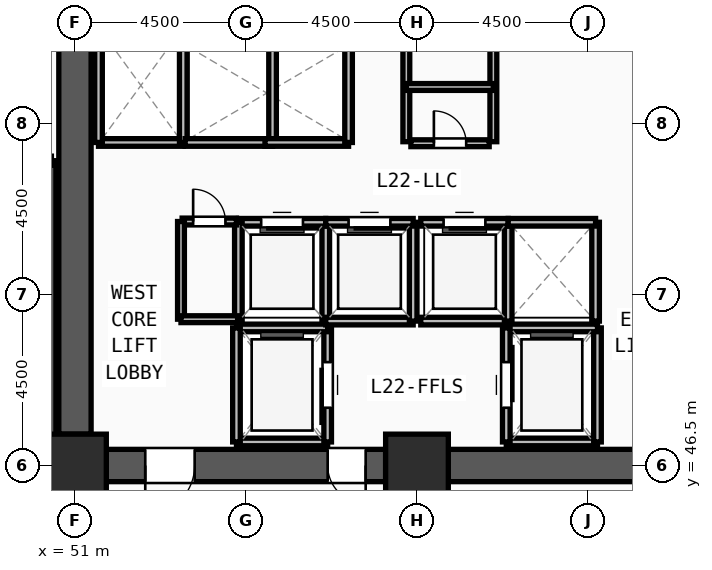
"""IFC4 building model, lengths in metres.
Left out: names, types, materials, properties, quantities, classifications, styles, units other than length and angle.
Written with IfcOpenShell. Run it as: python <this file> out.ifc"""

import sys

from ifc_helpers import new_model, si_unit, direction, frame, frame_2d, origin, origin_2d, place, context, subcontext, project, spatial, rectangle, extrude, source, transform, mapped, element, fill, save


model = new_model("IFC4")
c1 = context("Model", 3, precision=1e-05, world=origin(), true_north=direction((0.0, 1.0)))
c2 = subcontext(c1, "Body", "Model", "MODEL_VIEW")
j1 = project(units=[si_unit("LENGTHUNIT", "METRE"), si_unit("PLANEANGLEUNIT", "RADIAN")], contexts=[c1])
p1 = place(None, origin())
s1 = spatial("IfcSite", under=j1, at=p1, CompositionType="ELEMENT")
p2 = place(p1, origin())
s2 = spatial("IfcBuilding", under=s1, at=p2, CompositionType="ELEMENT")
p3 = place(p2, frame((0.0, 0.0, 85.5)))
s3 = spatial("IfcBuildingStorey", under=s2, at=p3, CompositionType="ELEMENT", Elevation=85.5)
m1 = source(origin(), c2, "Body", "SweptSolid", [
    extrude(rectangle(XDim=1.65, YDim=1.65, at=origin_2d()), origin(), (0.0, 0.0, 1.0), 3.75),
])
for number, where, z_axis, x_axis in (
    (1, (51.0, 46.5, 0.0), (0.0, 0.0, 1.0), (1.0, 0.0, 0.0)),
    (2, (60.0, 46.5, 0.0), (0.0, 0.0, 1.0), (1.0, 0.0, 0.0)),
):
    element("IfcColumn", number, at=place(p3, frame(where, z_axis=z_axis, x_axis=x_axis)), inside=s3, PredefinedType="COLUMN", context=c2, shape_type="MappedRepresentation", body=[
        mapped(m1, transform((0.0, 0.0, 0.0), x_axis=(1.0, 0.0, 0.0), y_axis=(0.0, 1.0, 0.0), z_axis=(0.0, 0.0, 1.0), scale=1.0)),
    ])
p4 = place(p3, frame((68.175, 46.5, 0.0), z_axis=(0.0, 0.0, 1.0), x_axis=(-1.0, 0.0, 0.0)))
e3 = element("IfcWall", 3, at=p4, inside=s3, PredefinedType="SHEAR", context=c2, shape_type="SweptSolid", body=[
    extrude(rectangle(XDim=7.35, YDim=0.85, at=frame_2d((3.675, 0.0))), origin(), (0.0, 0.0, 1.0), 3.57),
])
m2 = source(origin(), c2, "Body", "SweptSolid", [
    extrude(rectangle(XDim=1.3, YDim=2.2, at=frame_2d((0.65, 1.1))), frame((0.0, 0.435, 0.0), z_axis=(0.0, -1.0, 0.0), x_axis=(1.0, 0.0, 0.0)), (0.0, 0.0, 1.0), 0.87),
])
p5 = place(p4, frame((1.025, 0.0, 0.0)))
e4 = element("IfcOpeningElement", 4, at=p5, cuts=e3, PredefinedType="OPENING", context=c2, shape_type="MappedRepresentation", body=[
    mapped(m2, transform((0.0, 0.0, 0.0), x_axis=(1.0, 0.0, 0.0), y_axis=(0.0, 1.0, 0.0), z_axis=(0.0, 0.0, 1.0), scale=1.0)),
])
p6 = place(p3, frame((59.175, 46.5, 0.0), z_axis=(0.0, 0.0, 1.0), x_axis=(-1.0, 0.0, 0.0)))
e5 = element("IfcWall", 5, at=p6, inside=s3, PredefinedType="SHEAR", context=c2, shape_type="SweptSolid", body=[
    extrude(rectangle(XDim=7.35, YDim=0.85, at=frame_2d((3.675, 0.0))), origin(), (0.0, 0.0, 1.0), 3.57),
])
p7 = place(p6, frame((5.025, 0.0, 0.0)))
e6 = element("IfcOpeningElement", 6, at=p7, cuts=e5, PredefinedType="OPENING", context=c2, shape_type="MappedRepresentation", body=[
    mapped(m2, transform((0.0, 0.0, 0.0), x_axis=(1.0, 0.0, 0.0), y_axis=(0.0, 1.0, 0.0), z_axis=(0.0, 0.0, 1.0), scale=1.0)),
])
m3 = source(origin(), c2, "Body", "SweptSolid", [
    extrude(rectangle(XDim=1.0, YDim=2.2, at=frame_2d((0.5, 1.1))), frame((0.0, 0.435, 0.0), z_axis=(0.0, -1.0, 0.0), x_axis=(1.0, 0.0, 0.0)), (0.0, 0.0, 1.0), 0.87),
])
p8 = place(p6, frame((0.525, 0.0, 0.0)))
e7 = element("IfcOpeningElement", 7, at=p8, cuts=e5, PredefinedType="OPENING", context=c2, shape_type="MappedRepresentation", body=[
    mapped(m3, transform((0.0, 0.0, 0.0), x_axis=(1.0, 0.0, 0.0), y_axis=(0.0, 1.0, 0.0), z_axis=(0.0, 0.0, 1.0), scale=1.0)),
])
p9 = place(p3, frame((51.0, 47.325, 0.0), z_axis=(0.0, 0.0, 1.0), x_axis=(0.0, 1.0, 0.0)))
e8 = element("IfcWall", 8, at=p9, inside=s3, PredefinedType="SHEAR", context=c2, shape_type="SweptSolid", body=[
    extrude(rectangle(XDim=13.35, YDim=0.85, at=frame_2d((6.675, 0.0))), origin(), (0.0, 0.0, 1.0), 3.57),
])
p10 = place(p3, frame((50.38, 46.7, 0.0), z_axis=(0.0, 0.0, 1.0), x_axis=(0.0, 1.0, 0.0)))
e9 = element("IfcWall", 9, at=p10, inside=s3, PredefinedType="SOLIDWALL", context=c2, shape_type="SweptSolid", body=[
    extrude(rectangle(XDim=7.82, YDim=0.24, at=frame_2d((3.91, 0.0))), origin(), (0.0, 0.0, 1.0), 3.57),
])
p11 = place(p3, frame((55.25, 47.12, 0.0), z_axis=(0.0, 0.0, 1.0), x_axis=(1.0, 0.0, 0.0)))
e10 = element("IfcWall", 10, at=p11, inside=s3, PredefinedType="SOLIDWALL", context=c2, shape_type="SweptSolid", body=[
    extrude(rectangle(XDim=2.4, YDim=0.2, at=frame_2d((1.2, 0.0))), origin(), (0.0, 0.0, 1.0), 3.57),
])
p12 = place(p3, frame((57.65, 47.12, 0.0), z_axis=(0.0, 0.0, 1.0), x_axis=(0.0, 1.0, 0.0)))
e11 = element("IfcWall", 11, at=p12, inside=s3, PredefinedType="SOLIDWALL", context=c2, shape_type="SweptSolid", body=[
    extrude(rectangle(XDim=3.0, YDim=0.2, at=frame_2d((1.5, 0.0))), origin(), (0.0, 0.0, 1.0), 3.57),
])
m4 = source(origin(), c2, "Body", "SweptSolid", [
    extrude(rectangle(XDim=1.2, YDim=2.3, at=frame_2d((0.6, 1.15))), frame((0.0, 0.11, 0.0), z_axis=(0.0, -1.0, 0.0), x_axis=(1.0, 0.0, 0.0)), (0.0, 0.0, 1.0), 0.22),
])
p13 = place(p12, frame((0.9, 0.0, 0.0)))
e12 = element("IfcOpeningElement", 12, at=p13, cuts=e11, PredefinedType="OPENING", context=c2, shape_type="MappedRepresentation", body=[
    mapped(m4, transform((0.0, 0.0, 0.0), x_axis=(1.0, 0.0, 0.0), y_axis=(0.0, 1.0, 0.0), z_axis=(0.0, 0.0, 1.0), scale=1.0)),
])
p14 = place(p3, frame((57.65, 50.12, 0.0), z_axis=(0.0, 0.0, 1.0), x_axis=(-1.0, 0.0, 0.0)))
e13 = element("IfcWall", 13, at=p14, inside=s3, PredefinedType="SOLIDWALL", context=c2, shape_type="SweptSolid", body=[
    extrude(rectangle(XDim=2.4, YDim=0.2, at=frame_2d((1.2, 0.0))), origin(), (0.0, 0.0, 1.0), 3.57),
])
p15 = place(p3, frame((55.25, 50.12, 0.0), z_axis=(0.0, 0.0, 1.0), x_axis=(0.0, -1.0, 0.0)))
e14 = element("IfcWall", 14, at=p15, inside=s3, PredefinedType="SOLIDWALL", context=c2, shape_type="SweptSolid", body=[
    extrude(rectangle(XDim=3.0, YDim=0.2, at=frame_2d((1.5, 0.0))), origin(), (0.0, 0.0, 1.0), 3.57),
])
p16 = place(p3, frame((62.35, 47.12, 0.0), z_axis=(0.0, 0.0, 1.0), x_axis=(1.0, 0.0, 0.0)))
e15 = element("IfcWall", 15, at=p16, inside=s3, PredefinedType="SOLIDWALL", context=c2, shape_type="SweptSolid", body=[
    extrude(rectangle(XDim=2.4, YDim=0.2, at=frame_2d((1.2, 0.0))), origin(), (0.0, 0.0, 1.0), 3.57),
])
p17 = place(p3, frame((64.75, 47.12, 0.0), z_axis=(0.0, 0.0, 1.0), x_axis=(0.0, 1.0, 0.0)))
e16 = element("IfcWall", 16, at=p17, inside=s3, PredefinedType="SOLIDWALL", context=c2, shape_type="SweptSolid", body=[
    extrude(rectangle(XDim=3.0, YDim=0.2, at=frame_2d((1.5, 0.0))), origin(), (0.0, 0.0, 1.0), 3.57),
])
p18 = place(p3, frame((64.75, 50.12, 0.0), z_axis=(0.0, 0.0, 1.0), x_axis=(-1.0, 0.0, 0.0)))
e17 = element("IfcWall", 17, at=p18, inside=s3, PredefinedType="SOLIDWALL", context=c2, shape_type="SweptSolid", body=[
    extrude(rectangle(XDim=2.4, YDim=0.2, at=frame_2d((1.2, 0.0))), origin(), (0.0, 0.0, 1.0), 3.57),
])
p19 = place(p3, frame((62.35, 50.12, 0.0), z_axis=(0.0, 0.0, 1.0), x_axis=(0.0, -1.0, 0.0)))
e18 = element("IfcWall", 18, at=p19, inside=s3, PredefinedType="SOLIDWALL", context=c2, shape_type="SweptSolid", body=[
    extrude(rectangle(XDim=3.0, YDim=0.2, at=frame_2d((1.5, 0.0))), origin(), (0.0, 0.0, 1.0), 3.57),
])
p20 = place(p19, frame((0.9, 0.0, 0.0)))
e19 = element("IfcOpeningElement", 19, at=p20, cuts=e18, PredefinedType="OPENING", context=c2, shape_type="MappedRepresentation", body=[
    mapped(m4, transform((0.0, 0.0, 0.0), x_axis=(1.0, 0.0, 0.0), y_axis=(0.0, 1.0, 0.0), z_axis=(0.0, 0.0, 1.0), scale=1.0)),
])
p21 = place(p3, frame((51.62, 55.0, 0.0), z_axis=(0.0, 0.0, 1.0), x_axis=(1.0, 0.0, 0.0)))
e20 = element("IfcWall", 20, at=p21, inside=s3, PredefinedType="SOLIDWALL", context=c2, shape_type="SweptSolid", body=[
    extrude(rectangle(XDim=2.23, YDim=0.2, at=frame_2d((1.115, 0.0))), origin(), (0.0, 0.0, 1.0), 3.57),
])
for number, where, z_axis, x_axis in (
    (21, (53.85, 55.0, 0.0), (0.0, 0.0, 1.0), (0.0, 1.0, 0.0)),
    (22, (51.62, 58.0, 0.0), (0.0, 0.0, 1.0), (0.0, -1.0, 0.0)),
):
    element("IfcWall", number, at=place(p3, frame(where, z_axis=z_axis, x_axis=x_axis)), inside=s3, PredefinedType="SOLIDWALL", context=c2, shape_type="SweptSolid", body=[
        extrude(rectangle(XDim=3.0, YDim=0.2, at=frame_2d((1.5, 0.0))), origin(), (0.0, 0.0, 1.0), 3.57),
    ])
p22 = place(p3, frame((57.6, 50.3, 0.0), z_axis=(0.0, 0.0, 1.0), x_axis=(0.0, 1.0, 0.0)))
e23 = element("IfcWall", 23, at=p22, inside=s3, PredefinedType="SOLIDWALL", context=c2, shape_type="SweptSolid", body=[
    extrude(rectangle(XDim=2.6, YDim=0.2, at=frame_2d((1.3, 0.0))), origin(), (0.0, 0.0, 1.0), 3.57),
])
p23 = place(p3, frame((57.6, 52.9, 0.0), z_axis=(0.0, 0.0, 1.0), x_axis=(-1.0, 0.0, 0.0)))
e24 = element("IfcWall", 24, at=p23, inside=s3, PredefinedType="SOLIDWALL", context=c2, shape_type="SweptSolid", body=[
    extrude(rectangle(XDim=2.3, YDim=0.2, at=frame_2d((1.15, 0.0))), origin(), (0.0, 0.0, 1.0), 3.57),
])
m5 = source(origin(), c2, "Body", "SweptSolid", [
    extrude(rectangle(XDim=1.1, YDim=2.2, at=frame_2d((0.55, 1.1))), frame((0.0, 0.11, 0.0), z_axis=(0.0, -1.0, 0.0), x_axis=(1.0, 0.0, 0.0)), (0.0, 0.0, 1.0), 0.22),
])
p24 = place(p23, frame((0.6, 0.0, 0.0)))
e25 = element("IfcOpeningElement", 25, at=p24, cuts=e24, PredefinedType="OPENING", context=c2, shape_type="MappedRepresentation", body=[
    mapped(m5, transform((0.0, 0.0, 0.0), x_axis=(1.0, 0.0, 0.0), y_axis=(0.0, 1.0, 0.0), z_axis=(0.0, 0.0, 1.0), scale=1.0)),
])
p25 = place(p3, frame((55.3, 52.9, 0.0), z_axis=(0.0, 0.0, 1.0), x_axis=(0.0, -1.0, 0.0)))
e26 = element("IfcWall", 26, at=p25, inside=s3, PredefinedType="SOLIDWALL", context=c2, shape_type="SweptSolid", body=[
    extrude(rectangle(XDim=2.6, YDim=0.2, at=frame_2d((1.3, 0.0))), origin(), (0.0, 0.0, 1.0), 3.57),
])
p26 = place(p3, frame((57.6, 50.3, 0.0), z_axis=(0.0, 0.0, 1.0), x_axis=(1.0, 0.0, 0.0)))
e27 = element("IfcWall", 27, at=p26, inside=s3, PredefinedType="SOLIDWALL", context=c2, shape_type="SweptSolid", body=[
    extrude(rectangle(XDim=2.3, YDim=0.2, at=frame_2d((1.15, 0.0))), origin(), (0.0, 0.0, 1.0), 3.57),
])
p27 = place(p3, frame((59.9, 50.3, 0.0), z_axis=(0.0, 0.0, 1.0), x_axis=(0.0, 1.0, 0.0)))
e28 = element("IfcWall", 28, at=p27, inside=s3, PredefinedType="SOLIDWALL", context=c2, shape_type="SweptSolid", body=[
    extrude(rectangle(XDim=2.6, YDim=0.2, at=frame_2d((1.3, 0.0))), origin(), (0.0, 0.0, 1.0), 3.57),
])
p28 = place(p3, frame((59.9, 52.9, 0.0), z_axis=(0.0, 0.0, 1.0), x_axis=(-1.0, 0.0, 0.0)))
e29 = element("IfcWall", 29, at=p28, inside=s3, PredefinedType="SOLIDWALL", context=c2, shape_type="SweptSolid", body=[
    extrude(rectangle(XDim=2.3, YDim=0.2, at=frame_2d((1.15, 0.0))), origin(), (0.0, 0.0, 1.0), 3.57),
])
p29 = place(p28, frame((0.6, 0.0, 0.0)))
e30 = element("IfcOpeningElement", 30, at=p29, cuts=e29, PredefinedType="OPENING", context=c2, shape_type="MappedRepresentation", body=[
    mapped(m5, transform((0.0, 0.0, 0.0), x_axis=(1.0, 0.0, 0.0), y_axis=(0.0, 1.0, 0.0), z_axis=(0.0, 0.0, 1.0), scale=1.0)),
])
p30 = place(p3, frame((60.1, 50.3, 0.0), z_axis=(0.0, 0.0, 1.0), x_axis=(1.0, 0.0, 0.0)))
e31 = element("IfcWall", 31, at=p30, inside=s3, PredefinedType="SOLIDWALL", context=c2, shape_type="SweptSolid", body=[
    extrude(rectangle(XDim=2.3, YDim=0.2, at=frame_2d((1.15, 0.0))), origin(), (0.0, 0.0, 1.0), 3.57),
])
p31 = place(p3, frame((62.4, 50.3, 0.0), z_axis=(0.0, 0.0, 1.0), x_axis=(0.0, 1.0, 0.0)))
e32 = element("IfcWall", 32, at=p31, inside=s3, PredefinedType="SOLIDWALL", context=c2, shape_type="SweptSolid", body=[
    extrude(rectangle(XDim=2.6, YDim=0.2, at=frame_2d((1.3, 0.0))), origin(), (0.0, 0.0, 1.0), 3.57),
])
p32 = place(p3, frame((62.4, 52.9, 0.0), z_axis=(0.0, 0.0, 1.0), x_axis=(-1.0, 0.0, 0.0)))
e33 = element("IfcWall", 33, at=p32, inside=s3, PredefinedType="SOLIDWALL", context=c2, shape_type="SweptSolid", body=[
    extrude(rectangle(XDim=2.3, YDim=0.2, at=frame_2d((1.15, 0.0))), origin(), (0.0, 0.0, 1.0), 3.57),
])
p33 = place(p32, frame((0.6, 0.0, 0.0)))
e34 = element("IfcOpeningElement", 34, at=p33, cuts=e33, PredefinedType="OPENING", context=c2, shape_type="MappedRepresentation", body=[
    mapped(m5, transform((0.0, 0.0, 0.0), x_axis=(1.0, 0.0, 0.0), y_axis=(0.0, 1.0, 0.0), z_axis=(0.0, 0.0, 1.0), scale=1.0)),
])
p34 = place(p3, frame((64.7, 50.3, 0.0), z_axis=(0.0, 0.0, 1.0), x_axis=(0.0, 1.0, 0.0)))
e35 = element("IfcWall", 35, at=p34, inside=s3, PredefinedType="SOLIDWALL", context=c2, shape_type="SweptSolid", body=[
    extrude(rectangle(XDim=2.6, YDim=0.2, at=frame_2d((1.3, 0.0))), origin(), (0.0, 0.0, 1.0), 3.57),
])
for number, where, z_axis, x_axis in (
    (36, (64.7, 52.9, 0.0), (0.0, 0.0, 1.0), (-1.0, 0.0, 0.0)),
    (37, (53.9, 55.0, 0.0), (0.0, 0.0, 1.0), (1.0, 0.0, 0.0)),
):
    element("IfcWall", number, at=place(p3, frame(where, z_axis=z_axis, x_axis=x_axis)), inside=s3, PredefinedType="SOLIDWALL", context=c2, shape_type="SweptSolid", body=[
        extrude(rectangle(XDim=2.3, YDim=0.2, at=frame_2d((1.15, 0.0))), origin(), (0.0, 0.0, 1.0), 3.57),
    ])
p35 = place(p3, frame((56.2, 55.0, 0.0), z_axis=(0.0, 0.0, 1.0), x_axis=(0.0, 1.0, 0.0)))
e38 = element("IfcWall", 38, at=p35, inside=s3, PredefinedType="SOLIDWALL", context=c2, shape_type="SweptSolid", body=[
    extrude(rectangle(XDim=2.6, YDim=0.2, at=frame_2d((1.3, 0.0))), origin(), (0.0, 0.0, 1.0), 3.57),
])
p36 = place(p3, frame((56.0, 55.0, 0.0), z_axis=(0.0, 0.0, 1.0), x_axis=(1.0, 0.0, 0.0)))
e39 = element("IfcWall", 39, at=p36, inside=s3, PredefinedType="SOLIDWALL", context=c2, shape_type="SweptSolid", body=[
    extrude(rectangle(XDim=2.2, YDim=0.2, at=frame_2d((1.1, 0.0))), origin(), (0.0, 0.0, 1.0), 3.57),
])
p37 = place(p3, frame((58.2, 55.0, 0.0), z_axis=(0.0, 0.0, 1.0), x_axis=(0.0, 1.0, 0.0)))
e40 = element("IfcWall", 40, at=p37, inside=s3, PredefinedType="SOLIDWALL", context=c2, shape_type="SweptSolid", body=[
    extrude(rectangle(XDim=2.6, YDim=0.2, at=frame_2d((1.3, 0.0))), origin(), (0.0, 0.0, 1.0), 3.57),
])
p38 = place(p3, frame((59.84, 54.98, 0.0), z_axis=(0.0, 0.0, 1.0), x_axis=(1.0, 0.0, 0.0)))
e41 = element("IfcWall", 41, at=p38, inside=s3, PredefinedType="PARTITIONING", context=c2, shape_type="SweptSolid", body=[
    extrude(rectangle(XDim=2.06, YDim=0.18, at=frame_2d((1.03, 0.0))), origin(), (0.0, 0.0, 1.0), 3.57),
])
m6 = source(origin(), c2, "Body", "SweptSolid", [
    extrude(rectangle(XDim=0.85, YDim=2.1, at=frame_2d((0.425, 1.05))), frame((0.0, 0.1, 0.0), z_axis=(0.0, -1.0, 0.0), x_axis=(1.0, 0.0, 0.0)), (0.0, 0.0, 1.0), 0.2),
])
p39 = place(p38, frame((0.605, 0.0, 0.0)))
e42 = element("IfcOpeningElement", 42, at=p39, cuts=e41, PredefinedType="OPENING", context=c2, shape_type="MappedRepresentation", body=[
    mapped(m6, transform((0.0, 0.0, 0.0), x_axis=(1.0, 0.0, 0.0), y_axis=(0.0, 1.0, 0.0), z_axis=(0.0, 0.0, 1.0), scale=1.0)),
])
p40 = place(p3, frame((53.82, 52.92, 0.0), z_axis=(0.0, 0.0, 1.0), x_axis=(1.0, 0.0, 0.0)))
e43 = element("IfcWall", 43, at=p40, inside=s3, PredefinedType="PARTITIONING", context=c2, shape_type="SweptSolid", body=[
    extrude(rectangle(XDim=1.43, YDim=0.18, at=frame_2d((0.715, 0.0))), origin(), (0.0, 0.0, 1.0), 3.57),
])
p41 = place(p40, frame((0.29, 0.0, 0.0)))
e44 = element("IfcOpeningElement", 44, at=p41, cuts=e43, PredefinedType="OPENING", context=c2, shape_type="MappedRepresentation", body=[
    mapped(m6, transform((0.0, 0.0, 0.0), x_axis=(1.0, 0.0, 0.0), y_axis=(0.0, 1.0, 0.0), z_axis=(0.0, 0.0, 1.0), scale=1.0)),
])
for number, where, z_axis, x_axis in (
    (45, (59.72, 55.02, 0.0), (0.0, 0.0, 1.0), (0.0, 1.0, 0.0)),
    (46, (62.01, 55.02, 0.0), (0.0, 0.0, 1.0), (0.0, 1.0, 0.0)),
):
    element("IfcWall", number, at=place(p3, frame(where, z_axis=z_axis, x_axis=x_axis)), inside=s3, PredefinedType="PARTITIONING", context=c2, shape_type="SweptSolid", body=[
        extrude(rectangle(XDim=2.88, YDim=0.18, at=frame_2d((1.44, 0.0))), origin(), (0.0, 0.0, 1.0), 3.57),
    ])
p42 = place(p3, frame((59.72, 56.46, 0.0), z_axis=(0.0, 0.0, 1.0), x_axis=(1.0, 0.0, 0.0)))
e47 = element("IfcWall", 47, at=p42, inside=s3, PredefinedType="PARTITIONING", context=c2, shape_type="SweptSolid", body=[
    extrude(rectangle(XDim=2.29, YDim=0.18, at=frame_2d((1.145, 0.0))), origin(), (0.0, 0.0, 1.0), 3.57),
])
p43 = place(p3, frame((53.79, 50.35, 0.0), z_axis=(0.0, 0.0, 1.0), x_axis=(0.0, 1.0, 0.0)))
e48 = element("IfcWall", 48, at=p43, inside=s3, PredefinedType="PARTITIONING", context=c2, shape_type="SweptSolid", body=[
    extrude(rectangle(XDim=2.57, YDim=0.18, at=frame_2d((1.285, 0.0))), origin(), (0.0, 0.0, 1.0), 3.57),
])
p44 = place(p3, frame((53.79, 50.35, 0.0), z_axis=(0.0, 0.0, 1.0), x_axis=(1.0, 0.0, 0.0)))
e49 = element("IfcWall", 49, at=p44, inside=s3, PredefinedType="PARTITIONING", context=c2, shape_type="SweptSolid", body=[
    extrude(rectangle(XDim=1.49, YDim=0.18, at=frame_2d((0.745, 0.0))), origin(), (0.0, 0.0, 1.0), 3.57),
])
m7 = source(origin(), c2, "Body", "SweptSolid", [
    extrude(rectangle(XDim=1.3, YDim=2.2, at=frame_2d((0.65, 1.1))), frame((0.0, 0.025, 0.0), z_axis=(0.0, -1.0, 0.0), x_axis=(1.0, 0.0, 0.0)), (0.0, 0.0, 1.0), 0.05),
])
p45 = place(p7, origin())
e50 = element("IfcDoor", 50, at=p45, inside=s3, OperationType="SINGLE_SWING_RIGHT", PredefinedType="DOOR", context=c2, shape_type="MappedRepresentation", body=[
    mapped(m7, transform((0.0, 0.0, 0.0), x_axis=(1.0, 0.0, 0.0), y_axis=(0.0, 1.0, 0.0), z_axis=(0.0, 0.0, 1.0), scale=1.0)),
])
fill(e6, e50)
m8 = source(origin(), c2, "Body", "SweptSolid", [
    extrude(rectangle(XDim=1.0, YDim=2.2, at=frame_2d((0.5, 1.1))), frame((0.0, 0.025, 0.0), z_axis=(0.0, -1.0, 0.0), x_axis=(1.0, 0.0, 0.0)), (0.0, 0.0, 1.0), 0.05),
])
p46 = place(p8, origin())
e51 = element("IfcDoor", 51, at=p46, inside=s3, OperationType="SINGLE_SWING_LEFT", PredefinedType="DOOR", context=c2, shape_type="MappedRepresentation", body=[
    mapped(m8, transform((0.0, 0.0, 0.0), x_axis=(1.0, 0.0, 0.0), y_axis=(0.0, 1.0, 0.0), z_axis=(0.0, 0.0, 1.0), scale=1.0)),
])
fill(e7, e51)
m9 = source(origin(), c2, "Body", "SweptSolid", [
    extrude(rectangle(XDim=1.2, YDim=2.3, at=frame_2d((0.6, 1.15))), frame((0.0, 0.025, 0.0), z_axis=(0.0, -1.0, 0.0), x_axis=(1.0, 0.0, 0.0)), (0.0, 0.0, 1.0), 0.05),
])
p47 = place(p13, origin())
e52 = element("IfcDoor", 52, at=p47, inside=s3, OperationType="SLIDING_TO_LEFT", PredefinedType="DOOR", context=c2, shape_type="MappedRepresentation", body=[
    mapped(m9, transform((0.0, 0.0, 0.0), x_axis=(1.0, 0.0, 0.0), y_axis=(0.0, 1.0, 0.0), z_axis=(0.0, 0.0, 1.0), scale=1.0)),
])
fill(e12, e52)
p48 = place(p20, origin())
e53 = element("IfcDoor", 53, at=p48, inside=s3, OperationType="SLIDING_TO_LEFT", PredefinedType="DOOR", context=c2, shape_type="MappedRepresentation", body=[
    mapped(m9, transform((0.0, 0.0, 0.0), x_axis=(1.0, 0.0, 0.0), y_axis=(0.0, 1.0, 0.0), z_axis=(0.0, 0.0, 1.0), scale=1.0)),
])
fill(e19, e53)
m10 = source(origin(), c2, "Body", "SweptSolid", [
    extrude(rectangle(XDim=1.1, YDim=2.2, at=frame_2d((0.55, 1.1))), frame((0.0, 0.025, 0.0), z_axis=(0.0, -1.0, 0.0), x_axis=(1.0, 0.0, 0.0)), (0.0, 0.0, 1.0), 0.05),
])
p49 = place(p24, origin())
e54 = element("IfcDoor", 54, at=p49, inside=s3, OperationType="SLIDING_TO_LEFT", PredefinedType="DOOR", context=c2, shape_type="MappedRepresentation", body=[
    mapped(m10, transform((0.0, 0.0, 0.0), x_axis=(1.0, 0.0, 0.0), y_axis=(0.0, 1.0, 0.0), z_axis=(0.0, 0.0, 1.0), scale=1.0)),
])
fill(e25, e54)
p50 = place(p29, origin())
e55 = element("IfcDoor", 55, at=p50, inside=s3, OperationType="SLIDING_TO_LEFT", PredefinedType="DOOR", context=c2, shape_type="MappedRepresentation", body=[
    mapped(m10, transform((0.0, 0.0, 0.0), x_axis=(1.0, 0.0, 0.0), y_axis=(0.0, 1.0, 0.0), z_axis=(0.0, 0.0, 1.0), scale=1.0)),
])
fill(e30, e55)
p51 = place(p33, origin())
e56 = element("IfcDoor", 56, at=p51, inside=s3, OperationType="SLIDING_TO_LEFT", PredefinedType="DOOR", context=c2, shape_type="MappedRepresentation", body=[
    mapped(m10, transform((0.0, 0.0, 0.0), x_axis=(1.0, 0.0, 0.0), y_axis=(0.0, 1.0, 0.0), z_axis=(0.0, 0.0, 1.0), scale=1.0)),
])
fill(e34, e56)
m11 = source(origin(), c2, "Body", "SweptSolid", [
    extrude(rectangle(XDim=0.85, YDim=2.1, at=frame_2d((0.425, 1.05))), frame((0.0, 0.025, 0.0), z_axis=(0.0, -1.0, 0.0), x_axis=(1.0, 0.0, 0.0)), (0.0, 0.0, 1.0), 0.05),
])
p52 = place(p39, origin())
e57 = element("IfcDoor", 57, at=p52, inside=s3, OperationType="SINGLE_SWING_LEFT", PredefinedType="DOOR", context=c2, shape_type="MappedRepresentation", body=[
    mapped(m11, transform((0.0, 0.0, 0.0), x_axis=(1.0, 0.0, 0.0), y_axis=(0.0, 1.0, 0.0), z_axis=(0.0, 0.0, 1.0), scale=1.0)),
])
fill(e42, e57)
p53 = place(p41, origin())
e58 = element("IfcDoor", 58, at=p53, inside=s3, OperationType="SINGLE_SWING_LEFT", PredefinedType="DOOR", context=c2, shape_type="MappedRepresentation", body=[
    mapped(m11, transform((0.0, 0.0, 0.0), x_axis=(1.0, 0.0, 0.0), y_axis=(0.0, 1.0, 0.0), z_axis=(0.0, 0.0, 1.0), scale=1.0)),
])
fill(e44, e58)
save(model, sys.argv[1])
